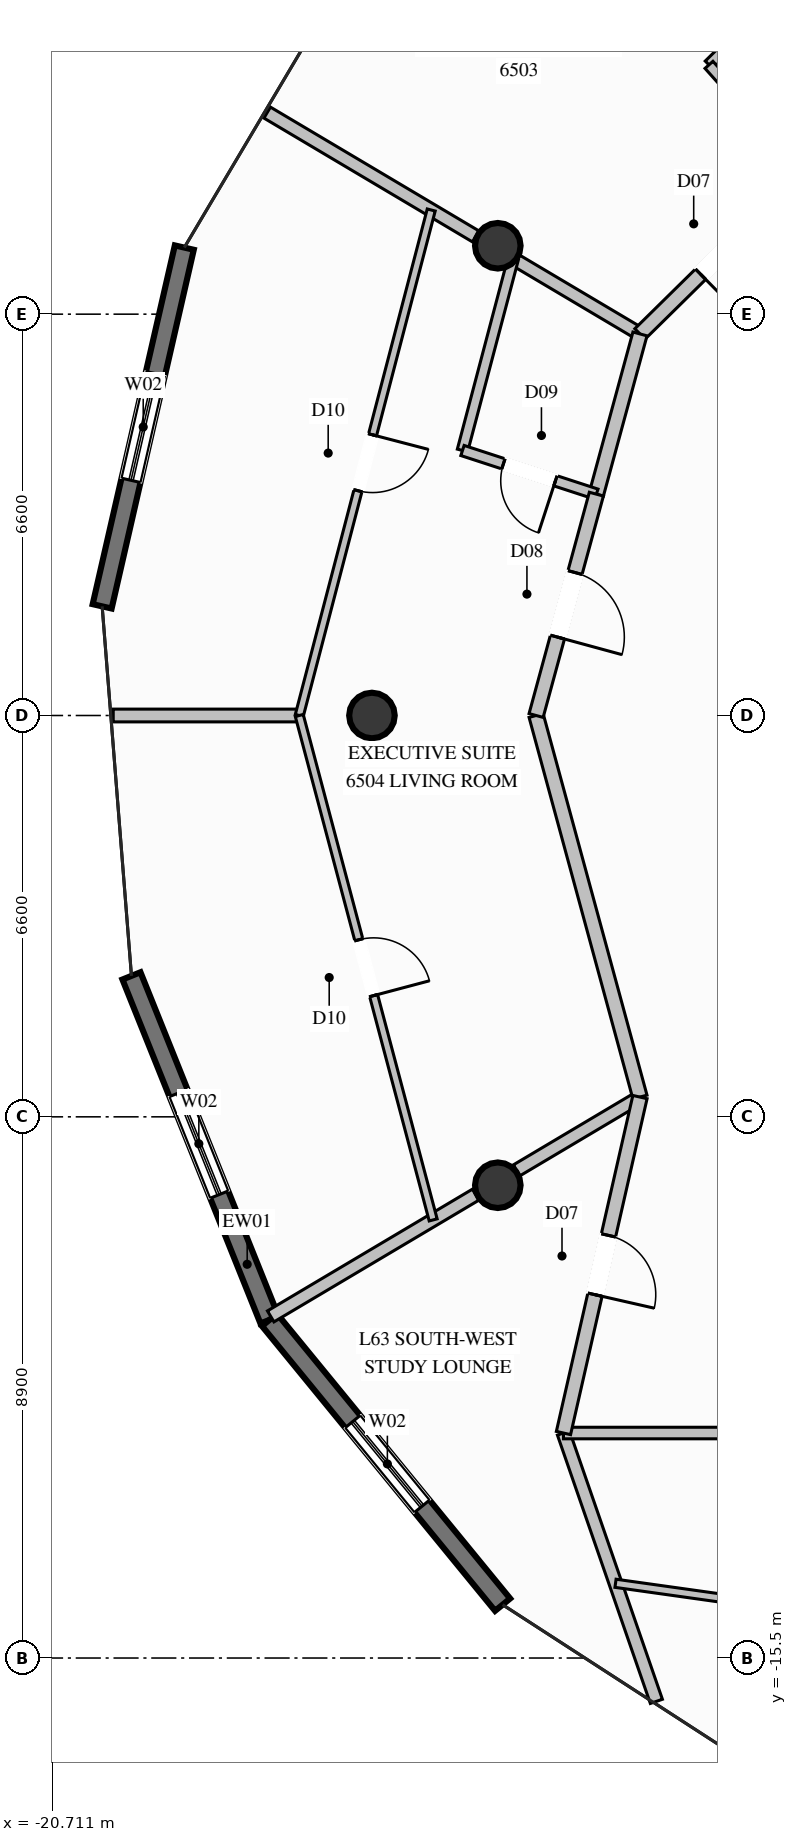
"""IFC4 building model, lengths in metres.
Left out: names, types, materials, properties, quantities, classifications, styles, units other than length and angle.
Written with IfcOpenShell. Run it as: python <this file> out.ifc"""

import sys

from ifc_helpers import new_model, si_unit, direction, frame, frame_2d, origin, origin_2d, place, context, subcontext, project, spatial, rectangle, circle, extrude, element, fill, save


model = new_model("IFC4")
c1 = context("Model", 3, precision=1e-05, world=origin(), true_north=direction((0.0, 1.0)))
c2 = subcontext(c1, "Body", "Model", "MODEL_VIEW")
j1 = project(units=[si_unit("LENGTHUNIT", "METRE"), si_unit("PLANEANGLEUNIT", "RADIAN")], contexts=[c1])
p1 = place(None, origin())
s1 = spatial("IfcSite", under=j1, at=p1, CompositionType="ELEMENT")
p2 = place(p1, origin())
s2 = spatial("IfcBuilding", under=s1, at=p2, CompositionType="ELEMENT")
p3 = place(p2, frame((0.0, 0.0, 243.0)))
s3 = spatial("IfcBuildingStorey", under=s2, at=p3, CompositionType="ELEMENT", Elevation=243.0)
for number, where, z_axis, x_axis in (
    (1, (-13.38, 7.725, 0.0), (0.0, 0.0, 1.0), (1.0, 0.0, 0.0)),
    (2, (-15.45, 0.0, 0.0), (0.0, 0.0, 1.0), (1.0, 0.0, 0.0)),
    (3, (-13.38, -7.725, 0.0), (0.0, 0.0, 1.0), (1.0, 0.0, 0.0)),
):
    element("IfcColumn", number, at=place(p3, frame(where, z_axis=z_axis, x_axis=x_axis)), inside=s3, PredefinedType="COLUMN", context=c2, shape_type="SweptSolid", body=[
        extrude(circle(Radius=0.375, at=origin_2d()), origin(), (0.0, 0.0, 1.0), 3.8),
    ])
p4 = place(p3, frame((-19.887, 1.795, 0.0), z_axis=(0.0, 0.0, 1.0), x_axis=(0.223212485592, 0.974769811943, 0.0)))
e4 = element("IfcWall", 4, at=p4, inside=s3, PredefinedType="SOLIDWALL", context=c2, shape_type="SweptSolid", body=[
    extrude(rectangle(XDim=6.053, YDim=0.32, at=frame_2d((3.026, 0.0))), origin(), (0.0, 0.0, 1.0), 3.57),
])
p5 = place(p4, frame((2.126, 0.0, 0.35)))
e5 = element("IfcOpeningElement", 5, at=p5, cuts=e4, PredefinedType="OPENING", context=c2, shape_type="SweptSolid", body=[
    extrude(rectangle(XDim=1.8, YDim=2.6, at=frame_2d((0.9, 1.3))), frame((0.0, 0.17, 0.0), z_axis=(0.0, -1.0, 0.0), x_axis=(1.0, 0.0, 0.0)), (0.0, 0.0, 1.0), 0.34),
])
p6 = place(p3, frame((-17.135, -9.939, 0.0), z_axis=(0.0, 0.0, 1.0), x_axis=(-0.372412492589, 0.928067311871, 0.0)))
e6 = element("IfcWall", 6, at=p6, inside=s3, PredefinedType="SOLIDWALL", context=c2, shape_type="SweptSolid", body=[
    extrude(rectangle(XDim=6.095, YDim=0.32, at=frame_2d((3.048, 0.0))), origin(), (0.0, 0.0, 1.0), 3.57),
])
p7 = place(p6, frame((2.22, 0.0, 0.35)))
e7 = element("IfcOpeningElement", 7, at=p7, cuts=e6, PredefinedType="OPENING", context=c2, shape_type="SweptSolid", body=[
    extrude(rectangle(XDim=1.8, YDim=2.6, at=frame_2d((0.9, 1.3))), frame((0.0, 0.17, 0.0), z_axis=(0.0, -1.0, 0.0), x_axis=(1.0, 0.0, 0.0)), (0.0, 0.0, 1.0), 0.34),
])
p8 = place(p3, frame((-13.301, -14.623, 0.0), z_axis=(0.0, 0.0, 1.0), x_axis=(-0.633391522875, 0.773831492478, 0.0)))
e8 = element("IfcWall", 8, at=p8, inside=s3, PredefinedType="SOLIDWALL", context=c2, shape_type="SweptSolid", body=[
    extrude(rectangle(XDim=6.053, YDim=0.32, at=frame_2d((3.027, 0.0))), origin(), (0.0, 0.0, 1.0), 3.57),
])
p9 = place(p8, frame((2.092, 0.0, 0.35)))
e9 = element("IfcOpeningElement", 9, at=p9, cuts=e8, PredefinedType="OPENING", context=c2, shape_type="SweptSolid", body=[
    extrude(rectangle(XDim=1.8, YDim=2.6, at=frame_2d((0.9, 1.3))), frame((0.0, 0.17, 0.0), z_axis=(0.0, -1.0, 0.0), x_axis=(1.0, 0.0, 0.0)), (0.0, 0.0, 1.0), 0.34),
])
p10 = place(p3, frame((-11.042, 6.275, 0.0), z_axis=(0.0, 0.0, 1.0), x_axis=(-0.859975377651, 0.510335526721, 0.0)))
e10 = element("IfcWall", 10, at=p10, inside=s3, PredefinedType="PARTITIONING", context=c2, shape_type="SweptSolid", body=[
    extrude(rectangle(XDim=2.359, YDim=0.21, at=frame_2d((1.18, 0.0))), origin(), (0.0, 0.0, 1.0), 3.086),
])
p11 = place(p3, frame((-13.744, 7.879, 0.0), z_axis=(0.0, 0.0, 1.0), x_axis=(-0.859849705024, 0.510547240488, 0.0)))
e11 = element("IfcWall", 11, at=p11, inside=s3, PredefinedType="PARTITIONING", context=c2, shape_type="SweptSolid", body=[
    extrude(rectangle(XDim=3.988, YDim=0.21, at=frame_2d((1.994, 0.0))), origin(), (0.0, 0.0, 1.0), 3.57),
])
p12 = place(p3, frame((-11.042, -6.275, 0.0), z_axis=(0.0, 0.0, 1.0), x_axis=(-0.859685751386, -0.510823265781, 0.0)))
e12 = element("IfcWall", 12, at=p12, inside=s3, PredefinedType="PARTITIONING", context=c2, shape_type="SweptSolid", body=[
    extrude(rectangle(XDim=2.359, YDim=0.21, at=frame_2d((1.18, 0.0))), origin(), (0.0, 0.0, 1.0), 3.086),
])
p13 = place(p3, frame((-13.744, -7.88, 0.0), z_axis=(0.0, 0.0, 1.0), x_axis=(-0.8597863995, -0.510653842867, 0.0)))
e13 = element("IfcWall", 13, at=p13, inside=s3, PredefinedType="PARTITIONING", context=c2, shape_type="SweptSolid", body=[
    extrude(rectangle(XDim=3.921, YDim=0.21, at=frame_2d((1.96, 0.0))), origin(), (0.0, 0.0, 1.0), 3.57),
])
p14 = place(p3, frame((-7.575, 13.007, 0.0), z_axis=(0.0, 0.0, 1.0), x_axis=(-0.710892186869, -0.703301001456, 0.0)))
e14 = element("IfcWall", 14, at=p14, inside=s3, PredefinedType="PLUMBINGWALL", context=c2, shape_type="SweptSolid", body=[
    extrude(rectangle(XDim=3.281, YDim=0.175, at=frame_2d((1.64, 0.0))), origin(), (0.0, 0.0, 1.0), 3.139),
])
p15 = place(p3, frame((-8.335, 8.94, 0.0), z_axis=(0.0, 0.0, 1.0), x_axis=(-0.666153503552, 0.745814661766, 0.0)))
e15 = element("IfcWall", 15, at=p15, inside=s3, PredefinedType="PLUMBINGWALL", context=c2, shape_type="SweptSolid", body=[
    extrude(rectangle(XDim=2.36, YDim=0.175, at=frame_2d((1.18, 0.0))), origin(), (0.0, 0.0, 1.0), 3.57),
])
p16 = place(p15, frame((0.73, 0.0, 0.0)))
e16 = element("IfcOpeningElement", 16, at=p16, cuts=e15, PredefinedType="OPENING", context=c2, shape_type="SweptSolid", body=[
    extrude(rectangle(XDim=0.9, YDim=2.1, at=frame_2d((0.45, 1.05))), frame((0.0, 0.098, 0.0), z_axis=(0.0, -1.0, 0.0), x_axis=(1.0, 0.0, 0.0)), (0.0, 0.0, 1.0), 0.195),
])
p17 = place(p3, frame((-8.335, 8.94, 0.0), z_axis=(0.0, 0.0, 1.0), x_axis=(-0.712612295011, -0.701558063883, 0.0)))
e17 = element("IfcWall", 17, at=p17, inside=s3, PredefinedType="PARTITIONING", context=c2, shape_type="SweptSolid", body=[
    extrude(rectangle(XDim=3.799, YDim=0.24, at=frame_2d((1.899, 0.0))), origin(), (0.0, 0.0, 1.0), 3.57),
])
p18 = place(p17, frame((1.399, 0.0, 0.0)))
e18 = element("IfcOpeningElement", 18, at=p18, cuts=e17, PredefinedType="OPENING", context=c2, shape_type="SweptSolid", body=[
    extrude(rectangle(XDim=1.0, YDim=2.2, at=frame_2d((0.5, 1.1))), frame((0.0, 0.13, 0.0), z_axis=(0.0, -1.0, 0.0), x_axis=(1.0, 0.0, 0.0)), (0.0, 0.0, 1.0), 0.26),
])
p19 = place(p3, frame((-11.042, 6.275, 0.0), z_axis=(0.0, 0.0, 1.0), x_axis=(-0.262572701387, -0.964912211803, 0.0)))
e19 = element("IfcWall", 19, at=p19, inside=s3, PredefinedType="PARTITIONING", context=c2, shape_type="SweptSolid", body=[
    extrude(rectangle(XDim=2.731, YDim=0.24, at=frame_2d((1.365, 0.0))), origin(), (0.0, 0.0, 1.0), 3.57),
])
p20 = place(p3, frame((-13.127, 7.513, 0.0), z_axis=(0.0, 0.0, 1.0), x_axis=(-0.25555737321, -0.966793891684, 0.0)))
e20 = element("IfcWall", 20, at=p20, inside=s3, PredefinedType="PLUMBINGWALL", context=c2, shape_type="SweptSolid", body=[
    extrude(rectangle(XDim=3.263, YDim=0.175, at=frame_2d((1.632, 0.0))), origin(), (0.0, 0.0, 1.0), 3.139),
])
p21 = place(p3, frame((-11.759, 3.64, 0.0), z_axis=(0.0, 0.0, 1.0), x_axis=(-0.950729164037, 0.310022671187, 0.0)))
e21 = element("IfcWall", 21, at=p21, inside=s3, PredefinedType="PLUMBINGWALL", context=c2, shape_type="SweptSolid", body=[
    extrude(rectangle(XDim=2.316, YDim=0.175, at=frame_2d((1.158, 0.0))), origin(), (0.0, 0.0, 1.0), 3.57),
])
p22 = place(p21, frame((0.708, 0.0, 0.0)))
e22 = element("IfcOpeningElement", 22, at=p22, cuts=e21, PredefinedType="OPENING", context=c2, shape_type="SweptSolid", body=[
    extrude(rectangle(XDim=0.9, YDim=2.1, at=frame_2d((0.45, 1.05))), frame((0.0, 0.098, 0.0), z_axis=(0.0, -1.0, 0.0), x_axis=(1.0, 0.0, 0.0)), (0.0, 0.0, 1.0), 0.195),
])
p23 = place(p3, frame((-16.645, 0.0, 0.0), z_axis=(0.0, 0.0, 1.0), x_axis=(-1.0, 0.0, 0.0)))
e23 = element("IfcWall", 23, at=p23, inside=s3, PredefinedType="PARTITIONING", context=c2, shape_type="SweptSolid", body=[
    extrude(rectangle(XDim=3.06, YDim=0.21, at=frame_2d((1.53, 0.0))), origin(), (0.0, 0.0, 1.0), 3.57),
])
p24 = place(p3, frame((-12.75, 0.0, 0.0), z_axis=(0.0, 0.0, 1.0), x_axis=(0.262640884433, -0.964893655189, 0.0)))
e24 = element("IfcWall", 24, at=p24, inside=s3, PredefinedType="PARTITIONING", context=c2, shape_type="SweptSolid", body=[
    extrude(rectangle(XDim=6.503, YDim=0.24, at=frame_2d((3.251, 0.0))), origin(), (0.0, 0.0, 1.0), 3.57),
])
p25 = place(p3, frame((-11.759, 3.64, 0.0), z_axis=(0.0, 0.0, 1.0), x_axis=(-0.2626902414, -0.964880219029, 0.0)))
e25 = element("IfcWall", 25, at=p25, inside=s3, PredefinedType="PARTITIONING", context=c2, shape_type="SweptSolid", body=[
    extrude(rectangle(XDim=3.772, YDim=0.24, at=frame_2d((1.886, 0.0))), origin(), (0.0, 0.0, 1.0), 3.57),
])
p26 = place(p25, frame((1.336, 0.0, 0.0)))
e26 = element("IfcOpeningElement", 26, at=p26, cuts=e25, PredefinedType="OPENING", context=c2, shape_type="SweptSolid", body=[
    extrude(rectangle(XDim=1.1, YDim=2.3, at=frame_2d((0.55, 1.15))), frame((0.0, 0.13, 0.0), z_axis=(0.0, -1.0, 0.0), x_axis=(1.0, 0.0, 0.0)), (0.0, 0.0, 1.0), 0.26),
])
p27 = place(p3, frame((-14.475, 8.313, 0.0), z_axis=(0.0, 0.0, 1.0), x_axis=(-0.252565334536, -0.967579842592, 0.0)))
e27 = element("IfcWall", 27, at=p27, inside=s3, PredefinedType="PARTITIONING", context=c2, shape_type="SweptSolid", body=[
    extrude(rectangle(XDim=8.592, YDim=0.135, at=frame_2d((4.296, 0.0))), origin(), (0.0, 0.0, 1.0), 3.57),
])
p28 = place(p27, frame((3.821, 0.0, 0.0)))
e28 = element("IfcOpeningElement", 28, at=p28, cuts=e27, PredefinedType="OPENING", context=c2, shape_type="SweptSolid", body=[
    extrude(rectangle(XDim=0.95, YDim=2.1, at=frame_2d((0.475, 1.05))), frame((0.0, 0.078, 0.0), z_axis=(0.0, -1.0, 0.0), x_axis=(1.0, 0.0, 0.0)), (0.0, 0.0, 1.0), 0.155),
])
p29 = place(p3, frame((-16.645, 0.0, 0.0), z_axis=(0.0, 0.0, 1.0), x_axis=(0.256566495237, -0.966526581901, 0.0)))
e29 = element("IfcWall", 29, at=p29, inside=s3, PredefinedType="PARTITIONING", context=c2, shape_type="SweptSolid", body=[
    extrude(rectangle(XDim=8.582, YDim=0.135, at=frame_2d((4.291, 0.0))), origin(), (0.0, 0.0, 1.0), 3.57),
])
p30 = place(p29, frame((3.816, 0.0, 0.0)))
e30 = element("IfcOpeningElement", 30, at=p30, cuts=e29, PredefinedType="OPENING", context=c2, shape_type="SweptSolid", body=[
    extrude(rectangle(XDim=0.95, YDim=2.1, at=frame_2d((0.475, 1.05))), frame((0.0, 0.078, 0.0), z_axis=(0.0, -1.0, 0.0), x_axis=(1.0, 0.0, 0.0)), (0.0, 0.0, 1.0), 0.155),
])
p31 = place(p3, frame((-12.3, -11.8, 0.0), z_axis=(0.0, 0.0, 1.0), x_axis=(0.327216501768, -0.944949395984, 0.0)))
e31 = element("IfcWall", 31, at=p31, inside=s3, PredefinedType="PARTITIONING", context=c2, shape_type="SweptSolid", body=[
    extrude(rectangle(XDim=4.67, YDim=0.21, at=frame_2d((2.335, 0.0))), origin(), (0.0, 0.0, 1.0), 3.57),
])
p32 = place(p3, frame((-12.3, -11.8, 0.0), z_axis=(0.0, 0.0, 1.0), x_axis=(1.0, 0.0, 0.0)))
e32 = element("IfcWall", 32, at=p32, inside=s3, PredefinedType="PARTITIONING", context=c2, shape_type="SweptSolid", body=[
    extrude(rectangle(XDim=12.3, YDim=0.19, at=frame_2d((6.15, 0.0))), origin(), (0.0, 0.0, 1.0), 3.57),
])
p33 = place(p32, frame((5.675, 0.0, 0.0)))
e33 = element("IfcOpeningElement", 33, at=p33, cuts=e32, PredefinedType="OPENING", context=c2, shape_type="SweptSolid", body=[
    extrude(rectangle(XDim=0.95, YDim=2.1, at=frame_2d((0.475, 1.05))), frame((0.0, 0.105, 0.0), z_axis=(0.0, -1.0, 0.0), x_axis=(1.0, 0.0, 0.0)), (0.0, 0.0, 1.0), 0.21),
])
p34 = place(p3, frame((-11.042, -6.275, 0.0), z_axis=(0.0, 0.0, 1.0), x_axis=(-0.222014008723, -0.975043475918, 0.0)))
e34 = element("IfcWall", 34, at=p34, inside=s3, PredefinedType="PARTITIONING", context=c2, shape_type="SweptSolid", body=[
    extrude(rectangle(XDim=5.667, YDim=0.24, at=frame_2d((2.833, 0.0))), origin(), (0.0, 0.0, 1.0), 3.57),
])
p35 = place(p34, frame((2.333, 0.0, 0.0)))
e35 = element("IfcOpeningElement", 35, at=p35, cuts=e34, PredefinedType="OPENING", context=c2, shape_type="SweptSolid", body=[
    extrude(rectangle(XDim=1.0, YDim=2.2, at=frame_2d((0.5, 1.1))), frame((0.0, 0.13, 0.0), z_axis=(0.0, -1.0, 0.0), x_axis=(1.0, 0.0, 0.0)), (0.0, 0.0, 1.0), 0.26),
])
p36 = place(p3, frame((-11.444, -14.271, 0.0), z_axis=(0.0, 0.0, 1.0), x_axis=(0.990280714827, -0.139083089705, 0.0)))
e36 = element("IfcWall", 36, at=p36, inside=s3, PredefinedType="PARTITIONING", context=c2, shape_type="SweptSolid", body=[
    extrude(rectangle(XDim=11.784, YDim=0.135, at=frame_2d((5.892, 0.0))), origin(), (0.0, 0.0, 1.0), 3.139),
])
p37 = place(p36, frame((5.417, 0.0, 0.0)))
e37 = element("IfcOpeningElement", 37, at=p37, cuts=e36, PredefinedType="OPENING", context=c2, shape_type="SweptSolid", body=[
    extrude(rectangle(XDim=0.95, YDim=2.1, at=frame_2d((0.475, 1.05))), frame((0.0, 0.078, 0.0), z_axis=(0.0, -1.0, 0.0), x_axis=(1.0, 0.0, 0.0)), (0.0, 0.0, 1.0), 0.155),
])
p38 = place(p5, origin())
e38 = element("IfcWindow", 38, at=p38, inside=s3, PartitioningType="SINGLE_PANEL", PredefinedType="WINDOW", context=c2, shape_type="SweptSolid", body=[
    extrude(rectangle(XDim=1.8, YDim=2.6, at=frame_2d((0.9, 1.3))), frame((0.0, 0.03, 0.0), z_axis=(0.0, -1.0, 0.0), x_axis=(1.0, 0.0, 0.0)), (0.0, 0.0, 1.0), 0.06),
])
fill(e5, e38)
p39 = place(p7, origin())
e39 = element("IfcWindow", 39, at=p39, inside=s3, PartitioningType="SINGLE_PANEL", PredefinedType="WINDOW", context=c2, shape_type="SweptSolid", body=[
    extrude(rectangle(XDim=1.8, YDim=2.6, at=frame_2d((0.9, 1.3))), frame((0.0, 0.03, 0.0), z_axis=(0.0, -1.0, 0.0), x_axis=(1.0, 0.0, 0.0)), (0.0, 0.0, 1.0), 0.06),
])
fill(e7, e39)
p40 = place(p9, origin())
e40 = element("IfcWindow", 40, at=p40, inside=s3, PartitioningType="SINGLE_PANEL", PredefinedType="WINDOW", context=c2, shape_type="SweptSolid", body=[
    extrude(rectangle(XDim=1.8, YDim=2.6, at=frame_2d((0.9, 1.3))), frame((0.0, 0.03, 0.0), z_axis=(0.0, -1.0, 0.0), x_axis=(1.0, 0.0, 0.0)), (0.0, 0.0, 1.0), 0.06),
])
fill(e9, e40)
p41 = place(p18, origin())
e41 = element("IfcDoor", 41, at=p41, inside=s3, OperationType="SINGLE_SWING_RIGHT", PredefinedType="DOOR", context=c2, shape_type="SweptSolid", body=[
    extrude(rectangle(XDim=1.0, YDim=2.2, at=frame_2d((0.5, 1.1))), frame((0.0, 0.025, 0.0), z_axis=(0.0, -1.0, 0.0), x_axis=(1.0, 0.0, 0.0)), (0.0, 0.0, 1.0), 0.05),
])
fill(e18, e41)
p42 = place(p22, origin())
e42 = element("IfcDoor", 42, at=p42, inside=s3, OperationType="SINGLE_SWING_LEFT", PredefinedType="DOOR", context=c2, shape_type="SweptSolid", body=[
    extrude(rectangle(XDim=0.9, YDim=2.1, at=frame_2d((0.45, 1.05))), frame((0.0, 0.025, 0.0), z_axis=(0.0, -1.0, 0.0), x_axis=(1.0, 0.0, 0.0)), (0.0, 0.0, 1.0), 0.05),
])
fill(e22, e42)
p43 = place(p26, origin())
e43 = element("IfcDoor", 43, at=p43, inside=s3, OperationType="SINGLE_SWING_RIGHT", PredefinedType="DOOR", context=c2, shape_type="SweptSolid", body=[
    extrude(rectangle(XDim=1.1, YDim=2.3, at=frame_2d((0.55, 1.15))), frame((0.0, 0.025, 0.0), z_axis=(0.0, -1.0, 0.0), x_axis=(1.0, 0.0, 0.0)), (0.0, 0.0, 1.0), 0.05),
])
fill(e26, e43)
p44 = place(p28, origin())
e44 = element("IfcDoor", 44, at=p44, inside=s3, OperationType="SINGLE_SWING_LEFT", PredefinedType="DOOR", context=c2, shape_type="SweptSolid", body=[
    extrude(rectangle(XDim=0.95, YDim=2.1, at=frame_2d((0.475, 1.05))), frame((0.0, 0.025, 0.0), z_axis=(0.0, -1.0, 0.0), x_axis=(1.0, 0.0, 0.0)), (0.0, 0.0, 1.0), 0.05),
])
fill(e28, e44)
p45 = place(p30, origin())
e45 = element("IfcDoor", 45, at=p45, inside=s3, OperationType="SINGLE_SWING_RIGHT", PredefinedType="DOOR", context=c2, shape_type="SweptSolid", body=[
    extrude(rectangle(XDim=0.95, YDim=2.1, at=frame_2d((0.475, 1.05))), frame((0.0, 0.025, 0.0), z_axis=(0.0, -1.0, 0.0), x_axis=(1.0, 0.0, 0.0)), (0.0, 0.0, 1.0), 0.05),
])
fill(e30, e45)
p46 = place(p35, origin())
e46 = element("IfcDoor", 46, at=p46, inside=s3, OperationType="SINGLE_SWING_RIGHT", PredefinedType="DOOR", context=c2, shape_type="SweptSolid", body=[
    extrude(rectangle(XDim=1.0, YDim=2.2, at=frame_2d((0.5, 1.1))), frame((0.0, 0.025, 0.0), z_axis=(0.0, -1.0, 0.0), x_axis=(1.0, 0.0, 0.0)), (0.0, 0.0, 1.0), 0.05),
])
fill(e35, e46)
save(model, sys.argv[1])
